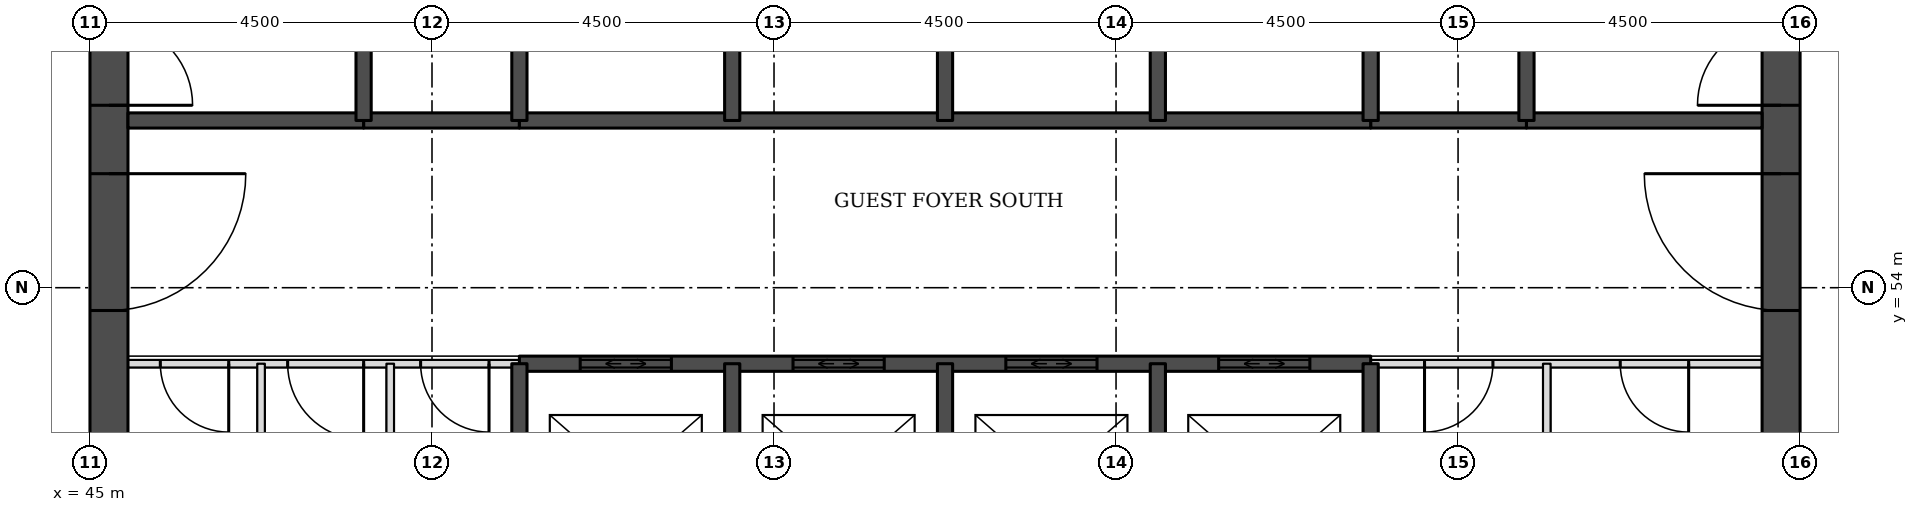
"""IFC4 building model, lengths in metres.
Left out: names, types, materials, properties, quantities, classifications, styles, units other than length and angle.
Written with IfcOpenShell. Run it as: python <this file> out.ifc"""

import sys

from ifc_helpers import new_model, si_unit, direction, frame, frame_2d, origin, place, context, subcontext, project, spatial, rectangle, extrude, element, fill, save


model = new_model("IFC4")
c1 = context("Model", 3, precision=1e-05, world=origin(), true_north=direction((0.0, 1.0)))
c2 = subcontext(c1, "Body", "Model", "MODEL_VIEW")
j1 = project(units=[si_unit("LENGTHUNIT", "METRE"), si_unit("PLANEANGLEUNIT", "RADIAN")], contexts=[c1])
p1 = place(None, origin())
s1 = spatial("IfcSite", under=j1, at=p1, CompositionType="ELEMENT")
p2 = place(p1, origin())
s2 = spatial("IfcBuilding", under=s1, at=p2, CompositionType="ELEMENT")
p3 = place(p2, frame((0.0, 0.0, 59.4)))
s3 = spatial("IfcBuildingStorey", under=s2, at=p3, CompositionType="ELEMENT", Elevation=59.4)
p4 = place(p3, frame((45.25, 49.5, 0.0), z_axis=(0.0, 0.0, 1.0), x_axis=(0.0, 1.0, 0.0)))
e1 = element("IfcWall", 1, at=p4, inside=s3, PredefinedType="SHEAR", context=c2, shape_type="SweptSolid", body=[
    extrude(rectangle(XDim=22.5, YDim=0.5, at=frame_2d((11.25, 0.0))), origin(), (0.0, 0.0, 1.0), 3.3),
])
p5 = place(p4, frame((4.2, 0.0, 0.0)))
e2 = element("IfcOpeningElement", 2, at=p5, cuts=e1, PredefinedType="OPENING", context=c2, shape_type="SweptSolid", body=[
    extrude(rectangle(XDim=1.8, YDim=2.1, at=frame_2d((0.9, 1.05))), frame((0.0, 0.26, 0.0), z_axis=(0.0, -1.0, 0.0), x_axis=(1.0, 0.0, 0.0)), (0.0, 0.0, 1.0), 0.52),
])
p6 = place(p4, frame((6.9, 0.0, 0.0)))
e3 = element("IfcOpeningElement", 3, at=p6, cuts=e1, PredefinedType="OPENING", context=c2, shape_type="SweptSolid", body=[
    extrude(rectangle(XDim=1.1, YDim=2.1, at=frame_2d((0.55, 1.05))), frame((0.0, 0.26, 0.0), z_axis=(0.0, -1.0, 0.0), x_axis=(1.0, 0.0, 0.0)), (0.0, 0.0, 1.0), 0.52),
])
p7 = place(p4, frame((13.6, 0.0, 0.0)))
e4 = element("IfcOpeningElement", 4, at=p7, cuts=e1, PredefinedType="OPENING", context=c2, shape_type="SweptSolid", body=[
    extrude(rectangle(XDim=1.1, YDim=2.1, at=frame_2d((0.55, 1.05))), frame((0.0, 0.26, 0.0), z_axis=(0.0, -1.0, 0.0), x_axis=(1.0, 0.0, 0.0)), (0.0, 0.0, 1.0), 0.52),
])
p8 = place(p4, frame((16.5, 0.0, 0.0)))
e5 = element("IfcOpeningElement", 5, at=p8, cuts=e1, PredefinedType="OPENING", context=c2, shape_type="SweptSolid", body=[
    extrude(rectangle(XDim=1.8, YDim=2.1, at=frame_2d((0.9, 1.05))), frame((0.0, 0.26, 0.0), z_axis=(0.0, -1.0, 0.0), x_axis=(1.0, 0.0, 0.0)), (0.0, 0.0, 1.0), 0.52),
])
p9 = place(p3, frame((67.25, 49.5, 0.0), z_axis=(0.0, 0.0, 1.0), x_axis=(0.0, 1.0, 0.0)))
e6 = element("IfcWall", 6, at=p9, inside=s3, PredefinedType="SHEAR", context=c2, shape_type="SweptSolid", body=[
    extrude(rectangle(XDim=22.5, YDim=0.5, at=frame_2d((11.25, 0.0))), origin(), (0.0, 0.0, 1.0), 3.3),
])
p10 = place(p9, frame((4.2, 0.0, 0.0)))
e7 = element("IfcOpeningElement", 7, at=p10, cuts=e6, PredefinedType="OPENING", context=c2, shape_type="SweptSolid", body=[
    extrude(rectangle(XDim=1.8, YDim=2.1, at=frame_2d((0.9, 1.05))), frame((0.0, 0.26, 0.0), z_axis=(0.0, -1.0, 0.0), x_axis=(1.0, 0.0, 0.0)), (0.0, 0.0, 1.0), 0.52),
])
p11 = place(p9, frame((6.9, 0.0, 0.0)))
e8 = element("IfcOpeningElement", 8, at=p11, cuts=e6, PredefinedType="OPENING", context=c2, shape_type="SweptSolid", body=[
    extrude(rectangle(XDim=1.1, YDim=2.1, at=frame_2d((0.55, 1.05))), frame((0.0, 0.26, 0.0), z_axis=(0.0, -1.0, 0.0), x_axis=(1.0, 0.0, 0.0)), (0.0, 0.0, 1.0), 0.52),
])
p12 = place(p9, frame((13.6, 0.0, 0.0)))
e9 = element("IfcOpeningElement", 9, at=p12, cuts=e6, PredefinedType="OPENING", context=c2, shape_type="SweptSolid", body=[
    extrude(rectangle(XDim=1.1, YDim=2.1, at=frame_2d((0.55, 1.05))), frame((0.0, 0.26, 0.0), z_axis=(0.0, -1.0, 0.0), x_axis=(1.0, 0.0, 0.0)), (0.0, 0.0, 1.0), 0.52),
])
p13 = place(p9, frame((16.5, 0.0, 0.0)))
e10 = element("IfcOpeningElement", 10, at=p13, cuts=e6, PredefinedType="OPENING", context=c2, shape_type="SweptSolid", body=[
    extrude(rectangle(XDim=1.8, YDim=2.1, at=frame_2d((0.9, 1.05))), frame((0.0, 0.26, 0.0), z_axis=(0.0, -1.0, 0.0), x_axis=(1.0, 0.0, 0.0)), (0.0, 0.0, 1.0), 0.52),
])
p14 = place(p3, frame((45.5, 53.0, 0.0), z_axis=(0.0, 0.0, 1.0), x_axis=(1.0, 0.0, 0.0)))
e11 = element("IfcWall", 11, at=p14, inside=s3, PredefinedType="PARTITIONING", context=c2, shape_type="SweptSolid", body=[
    extrude(rectangle(XDim=5.15, YDim=0.1, at=frame_2d((2.575, 0.0))), origin(), (0.0, 0.0, 1.0), 3.08),
])
p15 = place(p14, frame((0.426, 0.0, 0.0)))
e12 = element("IfcOpeningElement", 12, at=p15, cuts=e11, PredefinedType="OPENING", context=c2, shape_type="SweptSolid", body=[
    extrude(rectangle(XDim=0.9, YDim=2.1, at=frame_2d((0.45, 1.05))), frame((0.0, 0.06, 0.0), z_axis=(0.0, -1.0, 0.0), x_axis=(1.0, 0.0, 0.0)), (0.0, 0.0, 1.0), 0.12),
])
p16 = place(p14, frame((2.101, 0.0, 0.0)))
e13 = element("IfcOpeningElement", 13, at=p16, cuts=e11, PredefinedType="OPENING", context=c2, shape_type="SweptSolid", body=[
    extrude(rectangle(XDim=1.0, YDim=2.1, at=frame_2d((0.5, 1.05))), frame((0.0, 0.06, 0.0), z_axis=(0.0, -1.0, 0.0), x_axis=(1.0, 0.0, 0.0)), (0.0, 0.0, 1.0), 0.12),
])
p17 = place(p14, frame((3.85, 0.0, 0.0)))
e14 = element("IfcOpeningElement", 14, at=p17, cuts=e11, PredefinedType="OPENING", context=c2, shape_type="SweptSolid", body=[
    extrude(rectangle(XDim=0.9, YDim=2.1, at=frame_2d((0.45, 1.05))), frame((0.0, 0.06, 0.0), z_axis=(0.0, -1.0, 0.0), x_axis=(1.0, 0.0, 0.0)), (0.0, 0.0, 1.0), 0.12),
])
p18 = place(p3, frame((61.85, 53.0, 0.0), z_axis=(0.0, 0.0, 1.0), x_axis=(1.0, 0.0, 0.0)))
e15 = element("IfcWall", 15, at=p18, inside=s3, PredefinedType="PARTITIONING", context=c2, shape_type="SweptSolid", body=[
    extrude(rectangle(XDim=5.15, YDim=0.1, at=frame_2d((2.575, 0.0))), origin(), (0.0, 0.0, 1.0), 3.08),
])
p19 = place(p18, frame((3.284, 0.0, 0.0)))
e16 = element("IfcOpeningElement", 16, at=p19, cuts=e15, PredefinedType="OPENING", context=c2, shape_type="SweptSolid", body=[
    extrude(rectangle(XDim=0.9, YDim=2.1, at=frame_2d((0.45, 1.05))), frame((0.0, 0.06, 0.0), z_axis=(0.0, -1.0, 0.0), x_axis=(1.0, 0.0, 0.0)), (0.0, 0.0, 1.0), 0.12),
])
p20 = place(p18, frame((0.709, 0.0, 0.0)))
e17 = element("IfcOpeningElement", 17, at=p20, cuts=e15, PredefinedType="OPENING", context=c2, shape_type="SweptSolid", body=[
    extrude(rectangle(XDim=0.9, YDim=2.1, at=frame_2d((0.45, 1.05))), frame((0.0, 0.06, 0.0), z_axis=(0.0, -1.0, 0.0), x_axis=(1.0, 0.0, 0.0)), (0.0, 0.0, 1.0), 0.12),
])
p21 = place(p3, frame((50.65, 53.0, 0.0), z_axis=(0.0, 0.0, 1.0), x_axis=(1.0, 0.0, 0.0)))
e18 = element("IfcWall", 18, at=p21, inside=s3, PredefinedType="SOLIDWALL", context=c2, shape_type="SweptSolid", body=[
    extrude(rectangle(XDim=11.2, YDim=0.2, at=frame_2d((5.6, 0.0))), origin(), (0.0, 0.0, 1.0), 3.08),
])
p22 = place(p21, frame((0.8, 0.0, 0.0)))
e19 = element("IfcOpeningElement", 19, at=p22, cuts=e18, PredefinedType="OPENING", context=c2, shape_type="SweptSolid", body=[
    extrude(rectangle(XDim=1.2, YDim=2.1, at=frame_2d((0.6, 1.05))), frame((0.0, 0.11, 0.0), z_axis=(0.0, -1.0, 0.0), x_axis=(1.0, 0.0, 0.0)), (0.0, 0.0, 1.0), 0.22),
])
p23 = place(p21, frame((3.6, 0.0, 0.0)))
e20 = element("IfcOpeningElement", 20, at=p23, cuts=e18, PredefinedType="OPENING", context=c2, shape_type="SweptSolid", body=[
    extrude(rectangle(XDim=1.2, YDim=2.1, at=frame_2d((0.6, 1.05))), frame((0.0, 0.11, 0.0), z_axis=(0.0, -1.0, 0.0), x_axis=(1.0, 0.0, 0.0)), (0.0, 0.0, 1.0), 0.22),
])
p24 = place(p21, frame((6.4, 0.0, 0.0)))
e21 = element("IfcOpeningElement", 21, at=p24, cuts=e18, PredefinedType="OPENING", context=c2, shape_type="SweptSolid", body=[
    extrude(rectangle(XDim=1.2, YDim=2.1, at=frame_2d((0.6, 1.05))), frame((0.0, 0.11, 0.0), z_axis=(0.0, -1.0, 0.0), x_axis=(1.0, 0.0, 0.0)), (0.0, 0.0, 1.0), 0.22),
])
p25 = place(p21, frame((9.2, 0.0, 0.0)))
e22 = element("IfcOpeningElement", 22, at=p25, cuts=e18, PredefinedType="OPENING", context=c2, shape_type="SweptSolid", body=[
    extrude(rectangle(XDim=1.2, YDim=2.1, at=frame_2d((0.6, 1.05))), frame((0.0, 0.11, 0.0), z_axis=(0.0, -1.0, 0.0), x_axis=(1.0, 0.0, 0.0)), (0.0, 0.0, 1.0), 0.22),
])
for number, where, z_axis, x_axis in (
    (23, (48.6, 56.2, 0.0), (0.0, 0.0, 1.0), (1.0, 0.0, 0.0)),
    (24, (61.85, 56.2, 0.0), (0.0, 0.0, 1.0), (1.0, 0.0, 0.0)),
):
    element("IfcWall", number, at=place(p3, frame(where, z_axis=z_axis, x_axis=x_axis)), inside=s3, PredefinedType="SOLIDWALL", context=c2, shape_type="SweptSolid", body=[
        extrude(rectangle(XDim=2.05, YDim=0.2, at=frame_2d((1.025, 0.0))), origin(), (0.0, 0.0, 1.0), 3.08),
    ])
p26 = place(p3, frame((45.5, 56.2, 0.0), z_axis=(0.0, 0.0, 1.0), x_axis=(1.0, 0.0, 0.0)))
e25 = element("IfcWall", 25, at=p26, inside=s3, PredefinedType="SOLIDWALL", context=c2, shape_type="SweptSolid", body=[
    extrude(rectangle(XDim=3.1, YDim=0.2, at=frame_2d((1.55, 0.0))), origin(), (0.0, 0.0, 1.0), 3.08),
])
p27 = place(p3, frame((50.65, 56.2, 0.0), z_axis=(0.0, 0.0, 1.0), x_axis=(1.0, 0.0, 0.0)))
e26 = element("IfcWall", 26, at=p27, inside=s3, PredefinedType="SOLIDWALL", context=c2, shape_type="SweptSolid", body=[
    extrude(rectangle(XDim=11.2, YDim=0.2, at=frame_2d((5.6, 0.0))), origin(), (0.0, 0.0, 1.0), 3.08),
])
p28 = place(p3, frame((63.9, 56.2, 0.0), z_axis=(0.0, 0.0, 1.0), x_axis=(1.0, 0.0, 0.0)))
e27 = element("IfcWall", 27, at=p28, inside=s3, PredefinedType="SOLIDWALL", context=c2, shape_type="SweptSolid", body=[
    extrude(rectangle(XDim=3.1, YDim=0.2, at=frame_2d((1.55, 0.0))), origin(), (0.0, 0.0, 1.0), 3.08),
])
p29 = place(p3, frame((47.251, 50.0, 0.0), z_axis=(0.0, 0.0, 1.0), x_axis=(0.0, 1.0, 0.0)))
e28 = element("IfcWall", 28, at=p29, inside=s3, PredefinedType="PARTITIONING", context=c2, shape_type="SweptSolid", body=[
    extrude(rectangle(XDim=3.0, YDim=0.1, at=frame_2d((1.5, 0.0))), origin(), (0.0, 0.0, 1.0), 3.08),
])
p30 = place(p3, frame((48.6, 56.2, 0.0), z_axis=(0.0, 0.0, 1.0), x_axis=(0.0, 1.0, 0.0)))
e29 = element("IfcWall", 29, at=p30, inside=s3, PredefinedType="SOLIDWALL", context=c2, shape_type="SweptSolid", body=[
    extrude(rectangle(XDim=5.8, YDim=0.2, at=frame_2d((2.9, 0.0))), origin(), (0.0, 0.0, 1.0), 3.08),
])
p31 = place(p3, frame((48.95, 50.0, 0.0), z_axis=(0.0, 0.0, 1.0), x_axis=(0.0, 1.0, 0.0)))
e30 = element("IfcWall", 30, at=p31, inside=s3, PredefinedType="PARTITIONING", context=c2, shape_type="SweptSolid", body=[
    extrude(rectangle(XDim=3.0, YDim=0.1, at=frame_2d((1.5, 0.0))), origin(), (0.0, 0.0, 1.0), 3.08),
])
p32 = place(p3, frame((50.65, 50.0, 0.0), z_axis=(0.0, 0.0, 1.0), x_axis=(0.0, 1.0, 0.0)))
e31 = element("IfcWall", 31, at=p32, inside=s3, PredefinedType="SOLIDWALL", context=c2, shape_type="SweptSolid", body=[
    extrude(rectangle(XDim=3.0, YDim=0.2, at=frame_2d((1.5, 0.0))), origin(), (0.0, 0.0, 1.0), 3.08),
])
p33 = place(p3, frame((50.65, 56.2, 0.0), z_axis=(0.0, 0.0, 1.0), x_axis=(0.0, 1.0, 0.0)))
e32 = element("IfcWall", 32, at=p33, inside=s3, PredefinedType="SOLIDWALL", context=c2, shape_type="SweptSolid", body=[
    extrude(rectangle(XDim=2.8, YDim=0.2, at=frame_2d((1.4, 0.0))), origin(), (0.0, 0.0, 1.0), 3.08),
])
p34 = place(p3, frame((53.45, 50.0, 0.0), z_axis=(0.0, 0.0, 1.0), x_axis=(0.0, 1.0, 0.0)))
e33 = element("IfcWall", 33, at=p34, inside=s3, PredefinedType="SOLIDWALL", context=c2, shape_type="SweptSolid", body=[
    extrude(rectangle(XDim=3.0, YDim=0.2, at=frame_2d((1.5, 0.0))), origin(), (0.0, 0.0, 1.0), 3.08),
])
p35 = place(p3, frame((53.45, 56.2, 0.0), z_axis=(0.0, 0.0, 1.0), x_axis=(0.0, 1.0, 0.0)))
e34 = element("IfcWall", 34, at=p35, inside=s3, PredefinedType="SOLIDWALL", context=c2, shape_type="SweptSolid", body=[
    extrude(rectangle(XDim=2.8, YDim=0.2, at=frame_2d((1.4, 0.0))), origin(), (0.0, 0.0, 1.0), 3.08),
])
p36 = place(p3, frame((56.25, 50.0, 0.0), z_axis=(0.0, 0.0, 1.0), x_axis=(0.0, 1.0, 0.0)))
e35 = element("IfcWall", 35, at=p36, inside=s3, PredefinedType="SOLIDWALL", context=c2, shape_type="SweptSolid", body=[
    extrude(rectangle(XDim=3.0, YDim=0.2, at=frame_2d((1.5, 0.0))), origin(), (0.0, 0.0, 1.0), 3.08),
])
p37 = place(p3, frame((56.25, 56.2, 0.0), z_axis=(0.0, 0.0, 1.0), x_axis=(0.0, 1.0, 0.0)))
e36 = element("IfcWall", 36, at=p37, inside=s3, PredefinedType="SOLIDWALL", context=c2, shape_type="SweptSolid", body=[
    extrude(rectangle(XDim=2.8, YDim=0.2, at=frame_2d((1.4, 0.0))), origin(), (0.0, 0.0, 1.0), 3.08),
])
p38 = place(p3, frame((59.05, 50.0, 0.0), z_axis=(0.0, 0.0, 1.0), x_axis=(0.0, 1.0, 0.0)))
e37 = element("IfcWall", 37, at=p38, inside=s3, PredefinedType="SOLIDWALL", context=c2, shape_type="SweptSolid", body=[
    extrude(rectangle(XDim=3.0, YDim=0.2, at=frame_2d((1.5, 0.0))), origin(), (0.0, 0.0, 1.0), 3.08),
])
p39 = place(p3, frame((59.05, 56.2, 0.0), z_axis=(0.0, 0.0, 1.0), x_axis=(0.0, 1.0, 0.0)))
e38 = element("IfcWall", 38, at=p39, inside=s3, PredefinedType="SOLIDWALL", context=c2, shape_type="SweptSolid", body=[
    extrude(rectangle(XDim=2.8, YDim=0.2, at=frame_2d((1.4, 0.0))), origin(), (0.0, 0.0, 1.0), 3.08),
])
p40 = place(p3, frame((61.85, 50.0, 0.0), z_axis=(0.0, 0.0, 1.0), x_axis=(0.0, 1.0, 0.0)))
e39 = element("IfcWall", 39, at=p40, inside=s3, PredefinedType="SOLIDWALL", context=c2, shape_type="SweptSolid", body=[
    extrude(rectangle(XDim=3.0, YDim=0.2, at=frame_2d((1.5, 0.0))), origin(), (0.0, 0.0, 1.0), 3.08),
])
p41 = place(p3, frame((61.85, 56.2, 0.0), z_axis=(0.0, 0.0, 1.0), x_axis=(0.0, 1.0, 0.0)))
e40 = element("IfcWall", 40, at=p41, inside=s3, PredefinedType="SOLIDWALL", context=c2, shape_type="SweptSolid", body=[
    extrude(rectangle(XDim=2.8, YDim=0.2, at=frame_2d((1.4, 0.0))), origin(), (0.0, 0.0, 1.0), 3.08),
])
p42 = place(p3, frame((63.9, 56.2, 0.0), z_axis=(0.0, 0.0, 1.0), x_axis=(0.0, 1.0, 0.0)))
e41 = element("IfcWall", 41, at=p42, inside=s3, PredefinedType="SOLIDWALL", context=c2, shape_type="SweptSolid", body=[
    extrude(rectangle(XDim=5.8, YDim=0.2, at=frame_2d((2.9, 0.0))), origin(), (0.0, 0.0, 1.0), 3.08),
])
p43 = place(p3, frame((64.167, 50.0, 0.0), z_axis=(0.0, 0.0, 1.0), x_axis=(0.0, 1.0, 0.0)))
e42 = element("IfcWall", 42, at=p43, inside=s3, PredefinedType="PARTITIONING", context=c2, shape_type="SweptSolid", body=[
    extrude(rectangle(XDim=3.0, YDim=0.1, at=frame_2d((1.5, 0.0))), origin(), (0.0, 0.0, 1.0), 3.08),
])
p44 = place(p22, origin())
e43 = element("IfcDoor", 43, at=p44, inside=s3, OperationType="DOUBLE_DOOR_SLIDING", PredefinedType="DOOR", context=c2, shape_type="SweptSolid", body=[
    extrude(rectangle(XDim=1.2, YDim=2.1, at=frame_2d((0.6, 1.05))), frame((0.0, 0.025, 0.0), z_axis=(0.0, -1.0, 0.0), x_axis=(1.0, 0.0, 0.0)), (0.0, 0.0, 1.0), 0.05),
])
fill(e19, e43)
p45 = place(p23, origin())
e44 = element("IfcDoor", 44, at=p45, inside=s3, OperationType="DOUBLE_DOOR_SLIDING", PredefinedType="DOOR", context=c2, shape_type="SweptSolid", body=[
    extrude(rectangle(XDim=1.2, YDim=2.1, at=frame_2d((0.6, 1.05))), frame((0.0, 0.025, 0.0), z_axis=(0.0, -1.0, 0.0), x_axis=(1.0, 0.0, 0.0)), (0.0, 0.0, 1.0), 0.05),
])
fill(e20, e44)
p46 = place(p24, origin())
e45 = element("IfcDoor", 45, at=p46, inside=s3, OperationType="DOUBLE_DOOR_SLIDING", PredefinedType="DOOR", context=c2, shape_type="SweptSolid", body=[
    extrude(rectangle(XDim=1.2, YDim=2.1, at=frame_2d((0.6, 1.05))), frame((0.0, 0.025, 0.0), z_axis=(0.0, -1.0, 0.0), x_axis=(1.0, 0.0, 0.0)), (0.0, 0.0, 1.0), 0.05),
])
fill(e21, e45)
p47 = place(p25, origin())
e46 = element("IfcDoor", 46, at=p47, inside=s3, OperationType="DOUBLE_DOOR_SLIDING", PredefinedType="DOOR", context=c2, shape_type="SweptSolid", body=[
    extrude(rectangle(XDim=1.2, YDim=2.1, at=frame_2d((0.6, 1.05))), frame((0.0, 0.025, 0.0), z_axis=(0.0, -1.0, 0.0), x_axis=(1.0, 0.0, 0.0)), (0.0, 0.0, 1.0), 0.05),
])
fill(e22, e46)
p48 = place(p5, frame((1.8, 0.0, 0.0), z_axis=(0.0, 0.0, 1.0), x_axis=(-1.0, 0.0, 0.0)))
e47 = element("IfcDoor", 47, at=p48, inside=s3, OperationType="SINGLE_SWING_LEFT", PredefinedType="DOOR", context=c2, shape_type="SweptSolid", body=[
    extrude(rectangle(XDim=1.8, YDim=2.1, at=frame_2d((0.9, 1.05))), frame((0.0, 0.025, 0.0), z_axis=(0.0, -1.0, 0.0), x_axis=(1.0, 0.0, 0.0)), (0.0, 0.0, 1.0), 0.05),
])
fill(e2, e47)
p49 = place(p6, frame((1.1, 0.0, 0.0), z_axis=(0.0, 0.0, 1.0), x_axis=(-1.0, 0.0, 0.0)))
e48 = element("IfcDoor", 48, at=p49, inside=s3, OperationType="SINGLE_SWING_RIGHT", PredefinedType="DOOR", context=c2, shape_type="SweptSolid", body=[
    extrude(rectangle(XDim=1.1, YDim=2.1, at=frame_2d((0.55, 1.05))), frame((0.0, 0.025, 0.0), z_axis=(0.0, -1.0, 0.0), x_axis=(1.0, 0.0, 0.0)), (0.0, 0.0, 1.0), 0.05),
])
fill(e3, e48)
p50 = place(p10, origin())
e49 = element("IfcDoor", 49, at=p50, inside=s3, OperationType="SINGLE_SWING_RIGHT", PredefinedType="DOOR", context=c2, shape_type="SweptSolid", body=[
    extrude(rectangle(XDim=1.8, YDim=2.1, at=frame_2d((0.9, 1.05))), frame((0.0, 0.025, 0.0), z_axis=(0.0, -1.0, 0.0), x_axis=(1.0, 0.0, 0.0)), (0.0, 0.0, 1.0), 0.05),
])
fill(e7, e49)
p51 = place(p11, origin())
e50 = element("IfcDoor", 50, at=p51, inside=s3, OperationType="SINGLE_SWING_LEFT", PredefinedType="DOOR", context=c2, shape_type="SweptSolid", body=[
    extrude(rectangle(XDim=1.1, YDim=2.1, at=frame_2d((0.55, 1.05))), frame((0.0, 0.025, 0.0), z_axis=(0.0, -1.0, 0.0), x_axis=(1.0, 0.0, 0.0)), (0.0, 0.0, 1.0), 0.05),
])
fill(e8, e50)
p52 = place(p19, frame((0.9, 0.0, 0.0), z_axis=(0.0, 0.0, 1.0), x_axis=(-1.0, 0.0, 0.0)))
e51 = element("IfcDoor", 51, at=p52, inside=s3, OperationType="SINGLE_SWING_LEFT", PredefinedType="DOOR", context=c2, shape_type="SweptSolid", body=[
    extrude(rectangle(XDim=0.9, YDim=2.1, at=frame_2d((0.45, 1.05))), frame((0.0, 0.025, 0.0), z_axis=(0.0, -1.0, 0.0), x_axis=(1.0, 0.0, 0.0)), (0.0, 0.0, 1.0), 0.05),
])
fill(e16, e51)
p53 = place(p20, frame((0.9, 0.0, 0.0), z_axis=(0.0, 0.0, 1.0), x_axis=(-1.0, 0.0, 0.0)))
e52 = element("IfcDoor", 52, at=p53, inside=s3, OperationType="SINGLE_SWING_RIGHT", PredefinedType="DOOR", context=c2, shape_type="SweptSolid", body=[
    extrude(rectangle(XDim=0.9, YDim=2.1, at=frame_2d((0.45, 1.05))), frame((0.0, 0.025, 0.0), z_axis=(0.0, -1.0, 0.0), x_axis=(1.0, 0.0, 0.0)), (0.0, 0.0, 1.0), 0.05),
])
fill(e17, e52)
p54 = place(p15, frame((0.9, 0.0, 0.0), z_axis=(0.0, 0.0, 1.0), x_axis=(-1.0, 0.0, 0.0)))
e53 = element("IfcDoor", 53, at=p54, inside=s3, OperationType="SINGLE_SWING_LEFT", PredefinedType="DOOR", context=c2, shape_type="SweptSolid", body=[
    extrude(rectangle(XDim=0.9, YDim=2.1, at=frame_2d((0.45, 1.05))), frame((0.0, 0.025, 0.0), z_axis=(0.0, -1.0, 0.0), x_axis=(1.0, 0.0, 0.0)), (0.0, 0.0, 1.0), 0.05),
])
fill(e12, e53)
p55 = place(p16, frame((1.0, 0.0, 0.0), z_axis=(0.0, 0.0, 1.0), x_axis=(-1.0, 0.0, 0.0)))
e54 = element("IfcDoor", 54, at=p55, inside=s3, OperationType="SINGLE_SWING_LEFT", PredefinedType="DOOR", context=c2, shape_type="SweptSolid", body=[
    extrude(rectangle(XDim=1.0, YDim=2.1, at=frame_2d((0.5, 1.05))), frame((0.0, 0.025, 0.0), z_axis=(0.0, -1.0, 0.0), x_axis=(1.0, 0.0, 0.0)), (0.0, 0.0, 1.0), 0.05),
])
fill(e13, e54)
p56 = place(p17, frame((0.9, 0.0, 0.0), z_axis=(0.0, 0.0, 1.0), x_axis=(-1.0, 0.0, 0.0)))
e55 = element("IfcDoor", 55, at=p56, inside=s3, OperationType="SINGLE_SWING_LEFT", PredefinedType="DOOR", context=c2, shape_type="SweptSolid", body=[
    extrude(rectangle(XDim=0.9, YDim=2.1, at=frame_2d((0.45, 1.05))), frame((0.0, 0.025, 0.0), z_axis=(0.0, -1.0, 0.0), x_axis=(1.0, 0.0, 0.0)), (0.0, 0.0, 1.0), 0.05),
])
fill(e14, e55)
save(model, sys.argv[1])
